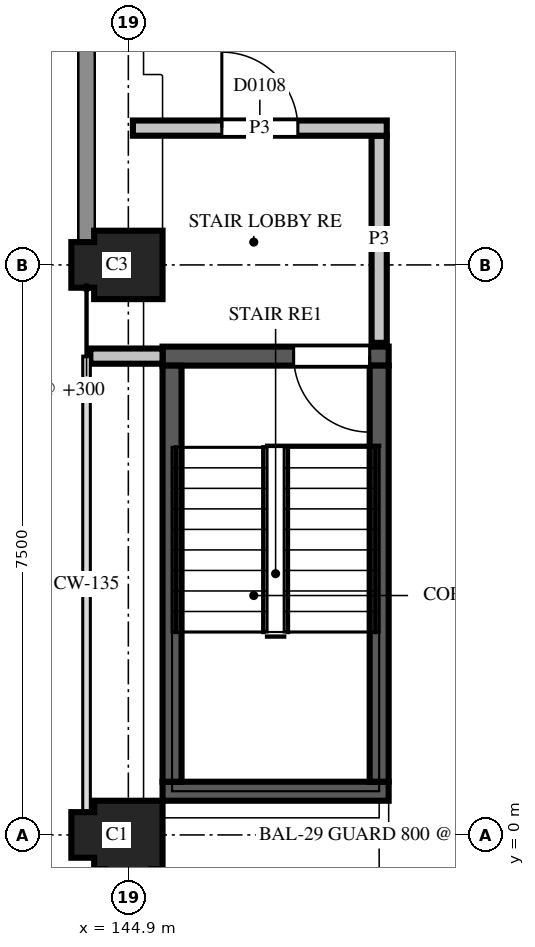
"""IFC4 building model, lengths in metres.
Left out: names, types, materials, properties, quantities, classifications, styles, units other than length and angle.
Written with IfcOpenShell. Run it as: python <this file> out.ifc"""

import sys

from ifc_helpers import new_model, si_unit, direction, frame, frame_2d, origin, place, context, subcontext, project, spatial, polyline, rectangle, outline, extrude, element, fill, save


model = new_model("IFC4")
c1 = context("Model", 3, precision=1e-05, world=origin(), true_north=direction((0.0, 1.0)))
c2 = subcontext(c1, "Body", "Model", "MODEL_VIEW")
j1 = project(units=[si_unit("LENGTHUNIT", "METRE"), si_unit("PLANEANGLEUNIT", "RADIAN")], contexts=[c1])
p1 = place(None, origin())
s1 = spatial("IfcSite", under=j1, at=p1, CompositionType="ELEMENT")
p2 = place(p1, origin())
s2 = spatial("IfcBuilding", under=s1, at=p2, CompositionType="ELEMENT")
p3 = place(p2, frame((0.0, 0.0, 4.5)))
s3 = spatial("IfcBuildingStorey", under=s2, at=p3, CompositionType="ELEMENT", Elevation=4.5)
p4 = place(p3, frame((144.9, 0.0, 0.0), z_axis=(0.0, 0.0, 1.0), x_axis=(-1.0, 0.0, 0.0)))
e1 = element("IfcColumn", 1, at=p4, inside=s3, PredefinedType="COLUMN", context=c2, shape_type="SweptSolid", body=[
    extrude(outline(polyline([(-0.45, -0.45), (0.45, -0.45), (0.45, -0.3), (0.75, -0.3), (0.75, 0.3), (0.45, 0.3), (0.45, 0.45), (0.3, 0.45), (0.3, 0.75), (-0.3, 0.75), (-0.3, 0.45), (-0.45, 0.45), (-0.45, -0.45)])), origin(), (0.0, 0.0, 1.0), 3.7),
])
p5 = place(p3, frame((144.9, 7.5, 0.0), z_axis=(0.0, 0.0, 1.0), x_axis=(-1.0, 0.0, 0.0)))
e2 = element("IfcColumn", 2, at=p5, inside=s3, PredefinedType="COLUMN", context=c2, shape_type="SweptSolid", body=[
    extrude(outline(polyline([(-0.45, -0.45), (0.45, -0.45), (0.45, -0.3), (0.75, -0.3), (0.75, 0.3), (0.45, 0.3), (0.45, 0.45), (-0.45, 0.45), (-0.45, -0.45)])), origin(), (0.0, 0.0, 1.0), 3.7),
])
p6 = place(p3, frame((145.35, 0.575, 0.0), z_axis=(0.0, 0.0, 1.0), x_axis=(1.0, 0.0, 0.0)))
e3 = element("IfcWall", 3, at=p6, inside=s3, PredefinedType="SHEAR", context=c2, shape_type="SweptSolid", body=[
    extrude(rectangle(XDim=2.975, YDim=0.25, at=frame_2d((1.487, 0.0))), origin(), (0.0, 0.0, 1.0), 3.7),
])
p7 = place(p3, frame((145.35, 6.3, 0.0), z_axis=(0.0, 0.0, 1.0), x_axis=(1.0, 0.0, 0.0)))
e4 = element("IfcWall", 4, at=p7, inside=s3, PredefinedType="SHEAR", context=c2, shape_type="SweptSolid", body=[
    extrude(rectangle(XDim=2.975, YDim=0.25, at=frame_2d((1.487, 0.0))), origin(), (0.0, 0.0, 1.0), 3.7),
])
p8 = place(p7, frame((1.725, 0.0, 0.0)))
e5 = element("IfcOpeningElement", 5, at=p8, cuts=e4, PredefinedType="OPENING", context=c2, shape_type="SweptSolid", body=[
    extrude(rectangle(XDim=1.0, YDim=2.1, at=frame_2d((0.5, 1.05))), frame((0.0, 0.135, 0.0), z_axis=(0.0, -1.0, 0.0), x_axis=(1.0, 0.0, 0.0)), (0.0, 0.0, 1.0), 0.27),
])
for number, where, z_axis, x_axis in (
    (6, (145.475, 0.7, 0.0), (0.0, 0.0, 1.0), (0.0, 1.0, 0.0)),
    (7, (148.2, 0.7, 0.0), (0.0, 0.0, 1.0), (0.0, 1.0, 0.0)),
):
    element("IfcWall", number, at=place(p3, frame(where, z_axis=z_axis, x_axis=x_axis)), inside=s3, PredefinedType="SHEAR", context=c2, shape_type="SweptSolid", body=[
        extrude(rectangle(XDim=5.475, YDim=0.25, at=frame_2d((2.738, 0.0))), origin(), (0.0, 0.0, 1.0), 3.7),
    ])
p9 = place(p3, frame((144.4, 6.3, 0.0), z_axis=(0.0, 0.0, 1.0), x_axis=(1.0, 0.0, 0.0)))
e8 = element("IfcWall", 8, at=p9, inside=s3, PredefinedType="PARTITIONING", context=c2, shape_type="SweptSolid", body=[
    extrude(rectangle(XDim=0.95, YDim=0.2, at=frame_2d((0.475, 0.0))), origin(), (0.0, 0.0, 1.0), 2.88),
])
p10 = place(p3, frame((148.2, 6.475, 0.0), z_axis=(0.0, 0.0, 1.0), x_axis=(0.0, 1.0, 0.0)))
e9 = element("IfcWall", 9, at=p10, inside=s3, PredefinedType="PARTITIONING", context=c2, shape_type="SweptSolid", body=[
    extrude(rectangle(XDim=2.725, YDim=0.2, at=frame_2d((1.362, 0.0))), origin(), (0.0, 0.0, 1.0), 2.88),
])
p11 = place(p3, frame((148.3, 9.3, 0.0), z_axis=(0.0, 0.0, 1.0), x_axis=(-1.0, 0.0, 0.0)))
e10 = element("IfcWall", 10, at=p11, inside=s3, PredefinedType="PARTITIONING", context=c2, shape_type="SweptSolid", body=[
    extrude(rectangle(XDim=3.34, YDim=0.2, at=frame_2d((1.67, 0.0))), origin(), (0.0, 0.0, 1.0), 2.88),
])
p12 = place(p11, frame((1.17, 0.0, 0.0)))
e11 = element("IfcOpeningElement", 11, at=p12, cuts=e10, PredefinedType="OPENING", context=c2, shape_type="SweptSolid", body=[
    extrude(rectangle(XDim=1.0, YDim=2.1, at=frame_2d((0.5, 1.05))), frame((0.0, 0.11, 0.0), z_axis=(0.0, -1.0, 0.0), x_axis=(1.0, 0.0, 0.0)), (0.0, 0.0, 1.0), 0.22),
])
p13 = place(p12, origin())
e12 = element("IfcDoor", 12, at=p13, inside=s3, OperationType="SINGLE_SWING_RIGHT", PredefinedType="DOOR", context=c2, shape_type="SweptSolid", body=[
    extrude(rectangle(XDim=1.0, YDim=2.1, at=frame_2d((0.5, 1.05))), frame((0.0, 0.025, 0.0), z_axis=(0.0, -1.0, 0.0), x_axis=(1.0, 0.0, 0.0)), (0.0, 0.0, 1.0), 0.05),
])
fill(e11, e12)
p14 = place(p8, origin())
e13 = element("IfcDoor", 13, at=p14, inside=s3, OperationType="SINGLE_SWING_RIGHT", PredefinedType="DOOR", context=c2, shape_type="SweptSolid", body=[
    extrude(rectangle(XDim=1.0, YDim=2.1, at=frame_2d((0.5, 1.05))), frame((0.0, 0.025, 0.0), z_axis=(0.0, -1.0, 0.0), x_axis=(1.0, 0.0, 0.0)), (0.0, 0.0, 1.0), 0.05),
])
fill(e5, e13)
save(model, sys.argv[1])
